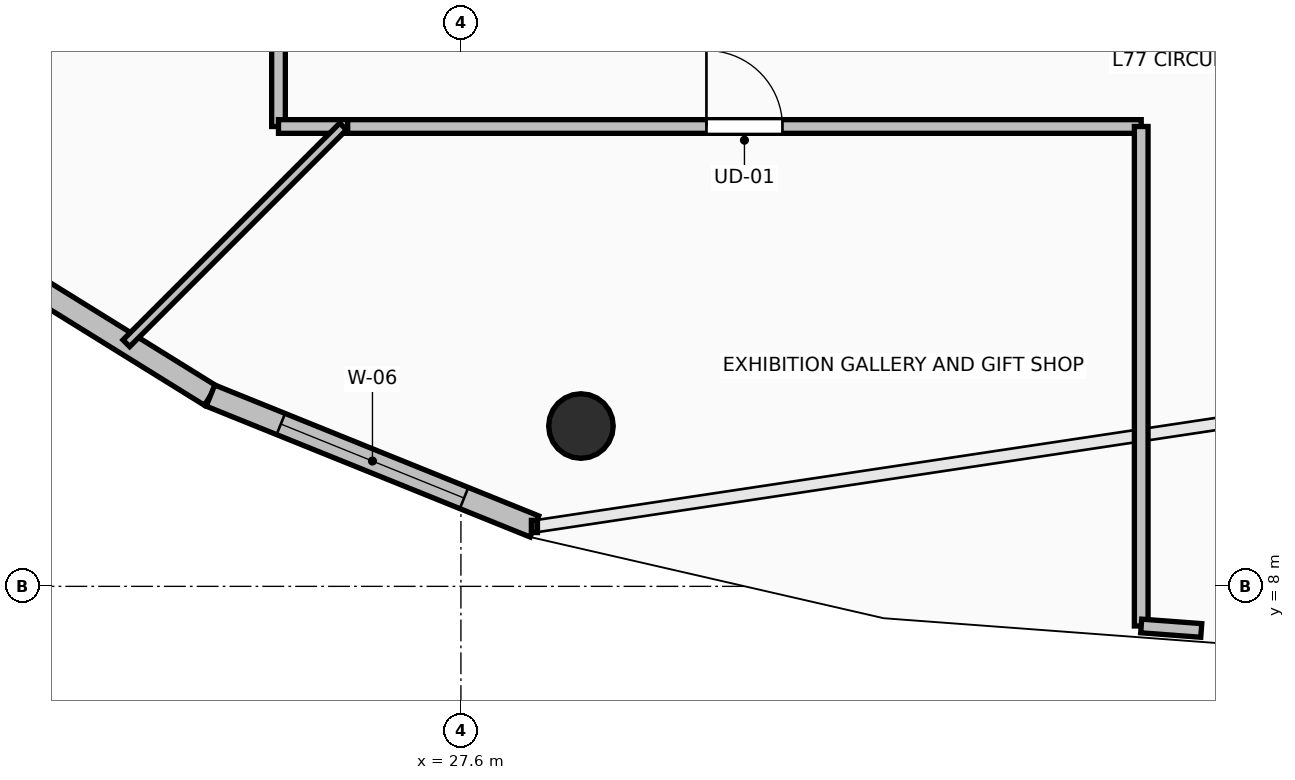
"""IFC4 building model, lengths in metres.
Left out: names, types, materials, properties, quantities, classifications, styles, units other than length and angle.
Written with IfcOpenShell. Run it as: python <this file> out.ifc"""

import sys

from ifc_helpers import new_model, si_unit, direction, frame, frame_2d, origin, origin_2d, place, context, subcontext, project, spatial, rectangle, circle, extrude, element, fill, save


model = new_model("IFC4")
c1 = context("Model", 3, precision=1e-05, world=origin(), true_north=direction((0.0, 1.0)))
c2 = subcontext(c1, "Body", "Model", "MODEL_VIEW")
j1 = project(units=[si_unit("LENGTHUNIT", "METRE"), si_unit("PLANEANGLEUNIT", "RADIAN")], contexts=[c1])
p1 = place(None, origin())
s1 = spatial("IfcSite", under=j1, at=p1, CompositionType="ELEMENT")
p2 = place(p1, origin())
s2 = spatial("IfcBuilding", under=s1, at=p2, CompositionType="ELEMENT")
p3 = place(p2, frame((0.0, 0.0, 285.4)))
s3 = spatial("IfcBuildingStorey", under=s2, at=p3, CompositionType="ELEMENT", Elevation=285.4)
p4 = place(p3, frame((29.179, 10.109, 0.0), z_axis=(0.0, 0.0, 1.0), x_axis=(-0.382683432365, -0.923879532511, 0.0)))
e1 = element("IfcColumn", 1, at=p4, inside=s3, PredefinedType="COLUMN", context=c2, shape_type="SweptSolid", body=[
    extrude(circle(Radius=0.425, at=origin_2d()), origin(), (0.0, 0.0, 1.0), 5.0),
])
p5 = place(p3, frame((20.57, 12.827, 0.0), z_axis=(0.0, 0.0, 1.0), x_axis=(0.849803177952, -0.527100141096, 0.0)))
e2 = element("IfcWall", 2, at=p5, inside=s3, PredefinedType="STANDARD", context=c2, shape_type="SweptSolid", body=[
    extrude(rectangle(XDim=4.396, YDim=0.3, at=frame_2d((2.198, 0.0))), origin(), (0.0, 0.0, 1.0), 4.69),
])
p6 = place(p3, frame((24.305, 10.51, 0.0), z_axis=(0.0, 0.0, 1.0), x_axis=(0.927196432407, -0.374575460663, 0.0)))
e3 = element("IfcWall", 3, at=p6, inside=s3, PredefinedType="STANDARD", context=c2, shape_type="SweptSolid", body=[
    extrude(rectangle(XDim=4.596, YDim=0.3, at=frame_2d((2.298, 0.0))), origin(), (0.0, 0.0, 1.0), 4.69),
])
p7 = place(p6, frame((0.998, 0.0, 0.85)))
e4 = element("IfcOpeningElement", 4, at=p7, cuts=e3, PredefinedType="OPENING", context=c2, shape_type="SweptSolid", body=[
    extrude(rectangle(XDim=2.6, YDim=2.5, at=frame_2d((1.3, 1.25))), frame((0.0, 0.165, 0.0), z_axis=(0.0, -1.0, 0.0), x_axis=(1.0, 0.0, 0.0)), (0.0, 0.0, 1.0), 0.33),
])
p8 = place(p3, frame((25.2, 35.95, 0.0), z_axis=(0.0, 0.0, 1.0), x_axis=(0.0, -1.0, 0.0)))
e5 = element("IfcWall", 5, at=p8, inside=s3, PredefinedType="PARTITIONING", context=c2, shape_type="SweptSolid", body=[
    extrude(rectangle(XDim=21.9, YDim=0.18, at=frame_2d((10.95, 0.0))), origin(), (0.0, 0.0, 1.0), 3.882),
])
p9 = place(p8, frame((10.45, 0.0, 0.0)))
e6 = element("IfcOpeningElement", 6, at=p9, cuts=e5, PredefinedType="OPENING", context=c2, shape_type="SweptSolid", body=[
    extrude(rectangle(XDim=1.0, YDim=2.15, at=frame_2d((0.5, 1.075))), frame((0.0, 0.105, 0.0), z_axis=(0.0, -1.0, 0.0), x_axis=(1.0, 0.0, 0.0)), (0.0, 0.0, 1.0), 0.21),
])
p10 = place(p3, frame((25.2, 14.05, 0.0), z_axis=(0.0, 0.0, 1.0), x_axis=(1.0, 0.0, 0.0)))
e7 = element("IfcWall", 7, at=p10, inside=s3, PredefinedType="PARTITIONING", context=c2, shape_type="SweptSolid", body=[
    extrude(rectangle(XDim=0.91, YDim=0.18, at=frame_2d((0.455, 0.0))), origin(), (0.0, 0.0, 1.0), 4.336),
])
p11 = place(p3, frame((26.11, 14.05, 0.0), z_axis=(0.0, 0.0, 1.0), x_axis=(1.0, 0.0, 0.0)))
e8 = element("IfcWall", 8, at=p11, inside=s3, PredefinedType="PARTITIONING", context=c2, shape_type="SweptSolid", body=[
    extrude(rectangle(XDim=10.44, YDim=0.18, at=frame_2d((5.22, 0.0))), origin(), (0.0, 0.0, 1.0), 3.882),
])
p12 = place(p11, frame((4.72, 0.0, 0.0)))
e9 = element("IfcOpeningElement", 9, at=p12, cuts=e8, PredefinedType="OPENING", context=c2, shape_type="SweptSolid", body=[
    extrude(rectangle(XDim=1.0, YDim=2.15, at=frame_2d((0.5, 1.075))), frame((0.0, 0.105, 0.0), z_axis=(0.0, -1.0, 0.0), x_axis=(1.0, 0.0, 0.0)), (0.0, 0.0, 1.0), 0.21),
])
p13 = place(p3, frame((36.55, 14.05, 0.0), z_axis=(0.0, 0.0, 1.0), x_axis=(0.0, -1.0, 0.0)))
e10 = element("IfcWall", 10, at=p13, inside=s3, PredefinedType="PARTITIONING", context=c2, shape_type="SweptSolid", body=[
    extrude(rectangle(XDim=6.571, YDim=0.18, at=frame_2d((3.286, 0.0))), origin(), (0.0, 0.0, 1.0), 4.274),
])
p14 = place(p3, frame((36.55, 7.479, 0.0), z_axis=(0.0, 0.0, 1.0), x_axis=(0.997215374878, -0.074575439036, 0.0)))
e11 = element("IfcWall", 11, at=p14, inside=s3, PredefinedType="PARTITIONING", context=c2, shape_type="SweptSolid", body=[
    extrude(rectangle(XDim=0.792, YDim=0.18, at=frame_2d((0.396, 0.0))), origin(), (0.0, 0.0, 1.0), 4.69),
])
p15 = place(p3, frame((23.198, 11.198, 0.0), z_axis=(0.0, 0.0, 1.0), x_axis=(0.707106781187, 0.707106781187, 0.0)))
e12 = element("IfcWall", 12, at=p15, inside=s3, PredefinedType="PARTITIONING", context=c2, shape_type="SweptSolid", body=[
    extrude(rectangle(XDim=4.033, YDim=0.125, at=frame_2d((2.017, 0.0))), origin(), (0.0, 0.0, 1.0), 4.274),
])
p16 = place(p7, origin())
e13 = element("IfcWindow", 13, at=p16, inside=s3, PartitioningType="SINGLE_PANEL", PredefinedType="WINDOW", context=c2, shape_type="SweptSolid", body=[
    extrude(rectangle(XDim=2.6, YDim=2.5, at=frame_2d((1.3, 1.25))), frame((0.0, 0.03, 0.0), z_axis=(0.0, -1.0, 0.0), x_axis=(1.0, 0.0, 0.0)), (0.0, 0.0, 1.0), 0.06),
])
fill(e4, e13)
p17 = place(p12, origin())
e14 = element("IfcDoor", 14, at=p17, inside=s3, OperationType="SINGLE_SWING_LEFT", PredefinedType="DOOR", context=c2, shape_type="SweptSolid", body=[
    extrude(rectangle(XDim=1.0, YDim=2.15, at=frame_2d((0.5, 1.075))), frame((0.0, 0.025, 0.0), z_axis=(0.0, -1.0, 0.0), x_axis=(1.0, 0.0, 0.0)), (0.0, 0.0, 1.0), 0.05),
])
fill(e9, e14)
save(model, sys.argv[1])
